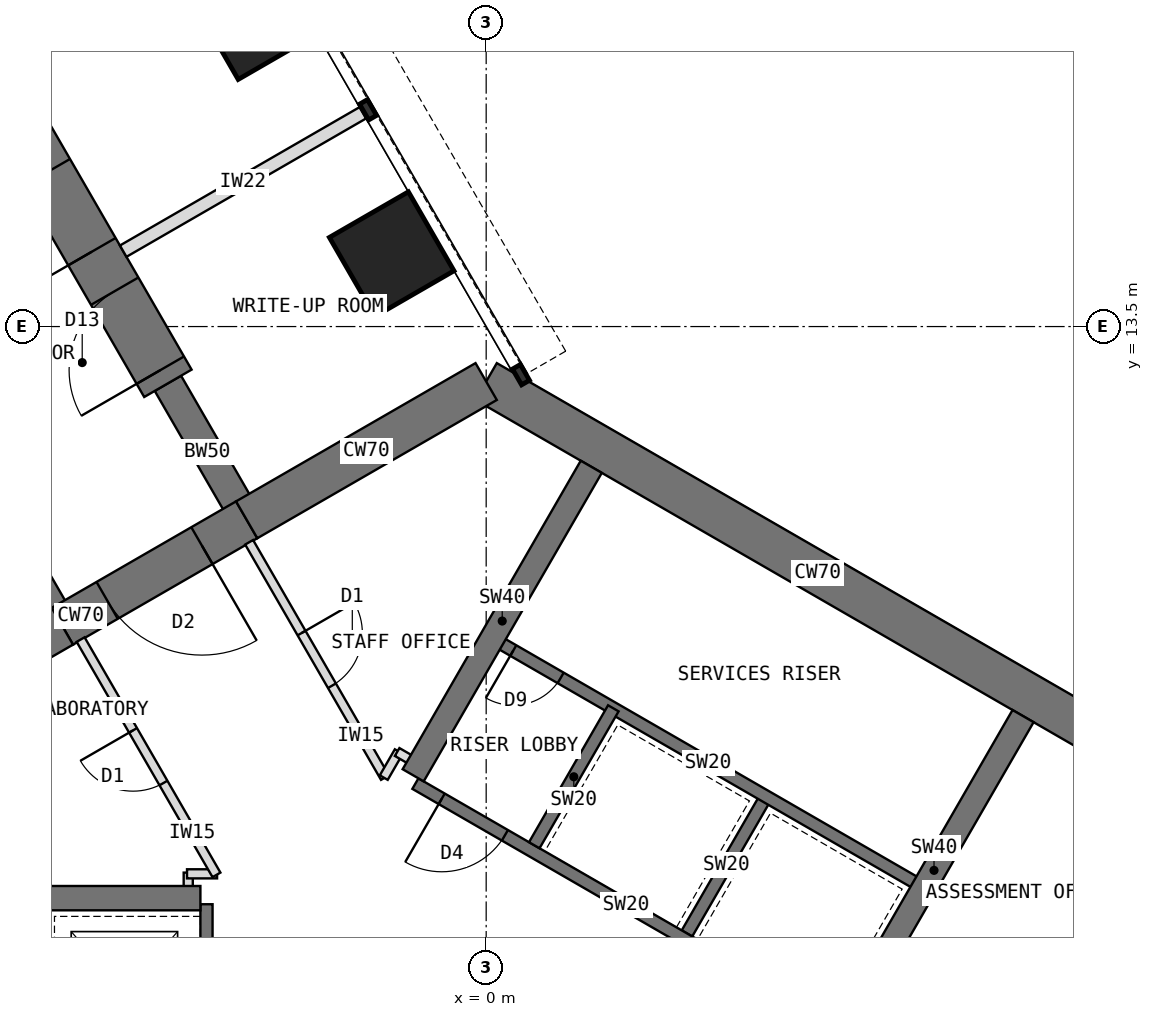
"""IFC4 building model, lengths in metres.
Left out: names, types, materials, properties, quantities, classifications, styles, units other than length and angle.
Written with IfcOpenShell. Run it as: python <this file> out.ifc"""

import sys

from ifc_helpers import new_model, si_unit, direction, frame, frame_2d, origin, origin_2d, place, context, subcontext, project, spatial, rectangle, extrude, element, fill, save


model = new_model("IFC4")
c1 = context("Model", 3, precision=1e-05, world=origin(), true_north=direction((0.0, 1.0)))
c2 = subcontext(c1, "Body", "Model", "MODEL_VIEW")
j1 = project(units=[si_unit("LENGTHUNIT", "METRE"), si_unit("PLANEANGLEUNIT", "RADIAN")], contexts=[c1])
p1 = place(None, origin())
s1 = spatial("IfcSite", under=j1, at=p1, CompositionType="ELEMENT")
p2 = place(p1, origin())
s2 = spatial("IfcBuilding", under=s1, at=p2, CompositionType="ELEMENT")
p3 = place(p2, frame((0.0, 0.0, 28.5)))
s3 = spatial("IfcBuildingStorey", under=s2, at=p3, CompositionType="ELEMENT", Elevation=28.5)
p4 = place(p3, frame((10.908, 6.298, 0.0), z_axis=(0.0, 0.0, 1.0), x_axis=(-0.866021940709, 0.500005998175, 0.0)))
e1 = element("IfcWall", 1, at=p4, inside=s3, PredefinedType="SHEAR", context=c2, shape_type="SweptSolid", body=[
    extrude(rectangle(XDim=12.596, YDim=0.7, at=frame_2d((6.298, 0.0))), origin(), (0.0, 0.0, 1.0), 4.0),
])
p5 = place(p3, frame((0.0, 12.596, 0.0), z_axis=(0.0, 0.0, 1.0), x_axis=(-0.866011268655, -0.500024481964, 0.0)))
e2 = element("IfcWall", 2, at=p5, inside=s3, PredefinedType="SHEAR", context=c2, shape_type="SweptSolid", body=[
    extrude(rectangle(XDim=4.548, YDim=0.7, at=frame_2d((2.274, 0.0))), origin(), (0.0, 0.0, 1.0), 4.0),
])
p6 = place(p3, frame((-3.939, 10.322, 0.0), z_axis=(0.0, 0.0, 1.0), x_axis=(-0.866019471182, -0.500010275428, 0.0)))
e3 = element("IfcWall", 3, at=p6, inside=s3, PredefinedType="SHEAR", context=c2, shape_type="SweptSolid", body=[
    extrude(rectangle(XDim=3.5, YDim=0.7, at=frame_2d((1.75, 0.0))), origin(), (0.0, 0.0, 1.0), 4.0),
])
p7 = place(p6, frame((0.85, 0.0, 0.0)))
e4 = element("IfcOpeningElement", 4, at=p7, cuts=e3, PredefinedType="OPENING", context=c2, shape_type="SweptSolid", body=[
    extrude(rectangle(XDim=1.8, YDim=2.1, at=frame_2d((0.9, 1.05))), frame((0.0, 0.36, 0.0), z_axis=(0.0, -1.0, 0.0), x_axis=(1.0, 0.0, 0.0)), (0.0, 0.0, 1.0), 0.72),
])
p8 = place(p3, frame((-6.97, 8.572, 0.0), z_axis=(0.0, 0.0, 1.0), x_axis=(-0.866034513004, -0.499984222037, 0.0)))
e5 = element("IfcWall", 5, at=p8, inside=s3, PredefinedType="SHEAR", context=c2, shape_type="SweptSolid", body=[
    extrude(rectangle(XDim=4.548, YDim=0.7, at=frame_2d((2.274, 0.0))), origin(), (0.0, 0.0, 1.0), 4.0),
])
for number, where, z_axis, x_axis in (
    (6, (-6.97, 8.572, 0.0), (0.0, 0.0, 1.0), (-0.5, 0.866, 0.0)),
    (7, (-3.939, 10.322, 0.0), (0.0, 0.0, 1.0), (-0.5, 0.866, 0.0)),
):
    element("IfcWall", number, at=place(p3, frame(where, z_axis=z_axis, x_axis=x_axis)), inside=s3, PredefinedType="SHEAR", context=c2, shape_type="SweptSolid", body=[
        extrude(rectangle(XDim=2.592, YDim=0.5, at=frame_2d((1.296, 0.0))), origin(), (0.0, 0.0, 1.0), 4.0),
    ])
p9 = place(p3, frame((-5.234, 12.566, 0.0), z_axis=(0.0, 0.0, 1.0), x_axis=(-0.500010103361, 0.866019570528, 0.0)))
e8 = element("IfcWall", 8, at=p9, inside=s3, PredefinedType="SHEAR", context=c2, shape_type="SweptSolid", body=[
    extrude(rectangle(XDim=13.2, YDim=0.9, at=frame_2d((6.6, 0.0))), origin(), (0.0, 0.0, 1.0), 4.0),
])
p10 = place(p9, frame((0.25, 0.0, 0.0)))
e9 = element("IfcOpeningElement", 9, at=p10, cuts=e8, PredefinedType="OPENING", context=c2, shape_type="SweptSolid", body=[
    extrude(rectangle(XDim=1.5, YDim=2.1, at=frame_2d((0.75, 1.05))), frame((0.0, 0.46, 0.0), z_axis=(0.0, -1.0, 0.0), x_axis=(1.0, 0.0, 0.0)), (0.0, 0.0, 1.0), 0.92),
])
p11 = place(p9, frame((2.5, 0.0, 0.0)))
e10 = element("IfcOpeningElement", 10, at=p11, cuts=e8, PredefinedType="OPENING", context=c2, shape_type="SweptSolid", body=[
    extrude(rectangle(XDim=1.5, YDim=2.1, at=frame_2d((0.75, 1.05))), frame((0.0, 0.46, 0.0), z_axis=(0.0, -1.0, 0.0), x_axis=(1.0, 0.0, 0.0)), (0.0, 0.0, 1.0), 0.92),
])
for number, where, z_axis, x_axis in (
    (11, (-1.554, 14.691, 0.0), (0.0, 0.0, 1.0), (0.866, 0.5, 0.0)),
    (12, (-3.804, 18.588, 0.0), (0.0, 0.0, 1.0), (0.866, 0.5, 0.0)),
):
    element("IfcColumn", number, at=place(p3, frame(where, z_axis=z_axis, x_axis=x_axis)), inside=s3, PredefinedType="COLUMN", context=c2, shape_type="SweptSolid", body=[
        extrude(rectangle(XDim=1.5, YDim=1.5, at=origin_2d()), origin(), (0.0, 0.0, 1.0), 4.0),
    ])
p12 = place(p3, frame((5.764, 1.984, 0.0), z_axis=(0.0, 0.0, 1.0), x_axis=(-0.866026010844, 0.49999894854, 0.0)))
e13 = element("IfcWall", 13, at=p12, inside=s3, PredefinedType="SHEAR", context=c2, shape_type="SweptSolid", body=[
    extrude(rectangle(XDim=8.0, YDim=0.2, at=frame_2d((4.0, 0.0))), origin(), (0.0, 0.0, 1.0), 4.0),
])
p13 = place(p12, frame((6.3, 0.0, 0.0)))
e14 = element("IfcOpeningElement", 14, at=p13, cuts=e13, PredefinedType="OPENING", context=c2, shape_type="SweptSolid", body=[
    extrude(rectangle(XDim=1.2, YDim=2.1, at=frame_2d((0.6, 1.05))), frame((0.0, 0.11, 0.0), z_axis=(0.0, -1.0, 0.0), x_axis=(1.0, 0.0, 0.0)), (0.0, 0.0, 1.0), 0.22),
])
for number, where, z_axis, x_axis in (
    (15, (3.303, 3.52, 0.0), (0.0, 0.0, 1.0), (0.5, 0.866, 0.0)),
    (16, (0.791, 4.97, 0.0), (0.0, 0.0, 1.0), (0.5, 0.866, 0.0)),
):
    element("IfcWall", number, at=place(p3, frame(where, z_axis=z_axis, x_axis=x_axis)), inside=s3, PredefinedType="SHEAR", context=c2, shape_type="SweptSolid", body=[
        extrude(rectangle(XDim=2.6, YDim=0.2, at=frame_2d((1.3, 0.0))), origin(), (0.0, 0.0, 1.0), 4.0),
    ])
p14 = place(p3, frame((7.114, 4.322, 0.0), z_axis=(0.0, 0.0, 1.0), x_axis=(-0.866026010844, 0.49999894854, 0.0)))
e17 = element("IfcWall", 17, at=p14, inside=s3, PredefinedType="SHEAR", context=c2, shape_type="SweptSolid", body=[
    extrude(rectangle(XDim=8.0, YDim=0.2, at=frame_2d((4.0, 0.0))), origin(), (0.0, 0.0, 1.0), 4.0),
])
p15 = place(p14, frame((6.8, 0.0, 0.0)))
e18 = element("IfcOpeningElement", 18, at=p15, cuts=e17, PredefinedType="OPENING", context=c2, shape_type="SweptSolid", body=[
    extrude(rectangle(XDim=0.9, YDim=2.1, at=frame_2d((0.45, 1.05))), frame((0.0, 0.11, 0.0), z_axis=(0.0, -1.0, 0.0), x_axis=(1.0, 0.0, 0.0)), (0.0, 0.0, 1.0), 0.22),
])
for number, where, z_axis, x_axis in (
    (19, (-1.201, 6.12, 0.0), (0.0, 0.0, 1.0), (0.5, 0.866, 0.0)),
    (20, (5.901, 2.02, 0.0), (0.0, 0.0, 1.0), (0.5, 0.866, 0.0)),
):
    element("IfcWall", number, at=place(p3, frame(where, z_axis=z_axis, x_axis=x_axis)), inside=s3, PredefinedType="SHEAR", context=c2, shape_type="SweptSolid", body=[
        extrude(rectangle(XDim=5.858, YDim=0.4, at=frame_2d((2.929, 0.0))), origin(), (0.0, 0.0, 1.0), 4.0),
    ])
p16 = place(p3, frame((-4.6, 4.0, 0.0), z_axis=(0.0, 0.0, 1.0), x_axis=(0.0, -1.0, 0.0)))
e21 = element("IfcWall", 21, at=p16, inside=s3, PredefinedType="SHEAR", context=c2, shape_type="SweptSolid", body=[
    extrude(rectangle(XDim=8.0, YDim=0.2, at=frame_2d((4.0, 0.0))), origin(), (0.0, 0.0, 1.0), 4.0),
])
p17 = place(p16, frame((6.3, 0.0, 0.0)))
e22 = element("IfcOpeningElement", 22, at=p17, cuts=e21, PredefinedType="OPENING", context=c2, shape_type="SweptSolid", body=[
    extrude(rectangle(XDim=1.2, YDim=2.1, at=frame_2d((0.6, 1.05))), frame((0.0, 0.11, 0.0), z_axis=(0.0, -1.0, 0.0), x_axis=(1.0, 0.0, 0.0)), (0.0, 0.0, 1.0), 0.22),
])
p18 = place(p16, frame((0.9, 0.0, 0.0)))
e23 = element("IfcOpeningElement", 23, at=p18, cuts=e21, PredefinedType="OPENING", context=c2, shape_type="SweptSolid", body=[
    extrude(rectangle(XDim=1.1, YDim=2.2, at=frame_2d((0.55, 1.1))), frame((0.0, 0.11, 0.0), z_axis=(0.0, -1.0, 0.0), x_axis=(1.0, 0.0, 0.0)), (0.0, 0.0, 1.0), 0.22),
])
p19 = place(p3, frame((-4.7, 4.1, 0.0), z_axis=(0.0, 0.0, 1.0), x_axis=(-1.0, 0.0, 0.0)))
e24 = element("IfcWall", 24, at=p19, inside=s3, PredefinedType="SHEAR", context=c2, shape_type="SweptSolid", body=[
    extrude(rectangle(XDim=5.858, YDim=0.4, at=frame_2d((2.929, 0.0))), origin(), (0.0, 0.0, 1.0), 4.0),
])
p20 = place(p3, frame((-5.97, 14.74, 0.0), z_axis=(0.0, 0.0, 1.0), x_axis=(0.866035472144, 0.499982560684, 0.0)))
e25 = element("IfcWall", 25, at=p20, inside=s3, PredefinedType="PARTITIONING", context=c2, shape_type="SweptSolid", body=[
    extrude(rectangle(XDim=4.55, YDim=0.215, at=frame_2d((2.275, 0.0))), origin(), (0.0, 0.0, 1.0), 3.8),
])
p21 = place(p3, frame((-4.9, 4.09, 0.0), z_axis=(0.0, 0.0, 1.0), x_axis=(0.0, 1.0, 0.0)))
e26 = element("IfcWall", 26, at=p21, inside=s3, PredefinedType="PARTITIONING", context=c2, shape_type="SweptSolid", body=[
    extrude(rectangle(XDim=0.43, YDim=0.15, at=frame_2d((0.215, 0.0))), origin(), (0.0, 0.0, 1.0), 3.8),
])
p22 = place(p3, frame((-4.92, 4.5, 0.0), z_axis=(0.0, 0.0, 1.0), x_axis=(1.0, 0.0, 0.0)))
e27 = element("IfcWall", 27, at=p22, inside=s3, PredefinedType="PARTITIONING", context=c2, shape_type="SweptSolid", body=[
    extrude(rectangle(XDim=0.494, YDim=0.15, at=frame_2d((0.247, 0.0))), origin(), (0.0, 0.0, 1.0), 3.8),
])
p23 = place(p3, frame((-4.436, 4.483, 0.0), z_axis=(0.0, 0.0, 1.0), x_axis=(-0.500017246033, 0.866015446554, 0.0)))
e28 = element("IfcWall", 28, at=p23, inside=s3, PredefinedType="PARTITIONING", context=c2, shape_type="SweptSolid", body=[
    extrude(rectangle(XDim=4.469, YDim=0.15, at=frame_2d((2.234, 0.0))), origin(), (0.0, 0.0, 1.0), 3.8),
])
p24 = place(p23, frame((1.744, 0.0, 0.0)))
e29 = element("IfcOpeningElement", 29, at=p24, cuts=e28, PredefinedType="OPENING", context=c2, shape_type="SweptSolid", body=[
    extrude(rectangle(XDim=1.0, YDim=2.1, at=frame_2d((0.5, 1.05))), frame((0.0, 0.085, 0.0), z_axis=(0.0, -1.0, 0.0), x_axis=(1.0, 0.0, 0.0)), (0.0, 0.0, 1.0), 0.17),
])
p25 = place(p3, frame((-3.898, 9.952, 0.0), z_axis=(0.0, 0.0, 1.0), x_axis=(0.499999927604, -0.866025445582, 0.0)))
e30 = element("IfcWall", 30, at=p25, inside=s3, PredefinedType="PARTITIONING", context=c2, shape_type="SweptSolid", body=[
    extrude(rectangle(XDim=4.468, YDim=0.15, at=frame_2d((2.234, 0.0))), origin(), (0.0, 0.0, 1.0), 3.8),
])
p26 = place(p25, frame((1.724, 0.0, 0.0)))
e31 = element("IfcOpeningElement", 31, at=p26, cuts=e30, PredefinedType="OPENING", context=c2, shape_type="SweptSolid", body=[
    extrude(rectangle(XDim=1.0, YDim=2.1, at=frame_2d((0.5, 1.05))), frame((0.0, 0.085, 0.0), z_axis=(0.0, -1.0, 0.0), x_axis=(1.0, 0.0, 0.0)), (0.0, 0.0, 1.0), 0.17),
])
p27 = place(p3, frame((-1.684, 6.083, 0.0), z_axis=(0.0, 0.0, 1.0), x_axis=(0.50033519877, 0.865831790172, 0.0)))
e32 = element("IfcWall", 32, at=p27, inside=s3, PredefinedType="PARTITIONING", context=c2, shape_type="SweptSolid", body=[
    extrude(rectangle(XDim=0.494, YDim=0.15, at=frame_2d((0.247, 0.0))), origin(), (0.0, 0.0, 1.0), 3.8),
])
p28 = place(p3, frame((-1.464, 6.503, 0.0), z_axis=(0.0, 0.0, 1.0), x_axis=(0.866138304741, -0.499804398801, 0.0)))
e33 = element("IfcWall", 33, at=p28, inside=s3, PredefinedType="PARTITIONING", context=c2, shape_type="SweptSolid", body=[
    extrude(rectangle(XDim=0.43, YDim=0.15, at=frame_2d((0.215, 0.0))), origin(), (0.0, 0.0, 1.0), 3.8),
])
p29 = place(p13, origin())
e34 = element("IfcDoor", 34, at=p29, inside=s3, OperationType="SINGLE_SWING_RIGHT", PredefinedType="DOOR", context=c2, shape_type="SweptSolid", body=[
    extrude(rectangle(XDim=1.2, YDim=2.1, at=frame_2d((0.6, 1.05))), frame((0.0, 0.025, 0.0), z_axis=(0.0, -1.0, 0.0), x_axis=(1.0, 0.0, 0.0)), (0.0, 0.0, 1.0), 0.05),
])
fill(e14, e34)
p30 = place(p15, origin())
e35 = element("IfcDoor", 35, at=p30, inside=s3, OperationType="SINGLE_SWING_RIGHT", PredefinedType="DOOR", context=c2, shape_type="SweptSolid", body=[
    extrude(rectangle(XDim=0.9, YDim=2.1, at=frame_2d((0.45, 1.05))), frame((0.0, 0.025, 0.0), z_axis=(0.0, -1.0, 0.0), x_axis=(1.0, 0.0, 0.0)), (0.0, 0.0, 1.0), 0.05),
])
fill(e18, e35)
p31 = place(p7, origin())
e36 = element("IfcDoor", 36, at=p31, inside=s3, OperationType="DOUBLE_DOOR_DOUBLE_SWING", PredefinedType="DOOR", context=c2, shape_type="SweptSolid", body=[
    extrude(rectangle(XDim=1.72, YDim=2.06, at=frame_2d((0.9, 1.03))), frame((0.0, 0.025, 0.0), z_axis=(0.0, -1.0, 0.0), x_axis=(1.0, 0.0, 0.0)), (0.0, 0.0, 1.0), 0.05),
    extrude(rectangle(XDim=0.04, YDim=2.1, at=frame_2d((0.02, 1.05))), frame((0.0, 0.35, 0.0), z_axis=(0.0, -1.0, 0.0), x_axis=(1.0, 0.0, 0.0)), (0.0, 0.0, 1.0), 0.699),
    extrude(rectangle(XDim=0.04, YDim=2.1, at=frame_2d((1.78, 1.05))), frame((0.0, 0.35, 0.0), z_axis=(0.0, -1.0, 0.0), x_axis=(1.0, 0.0, 0.0)), (0.0, 0.0, 1.0), 0.699),
    extrude(rectangle(XDim=1.72, YDim=0.04, at=frame_2d((0.9, 2.08))), frame((0.0, 0.35, 0.0), z_axis=(0.0, -1.0, 0.0), x_axis=(1.0, 0.0, 0.0)), (0.0, 0.0, 1.0), 0.699),
])
fill(e4, e36)
p32 = place(p26, origin())
e37 = element("IfcDoor", 37, at=p32, inside=s3, OperationType="SINGLE_SWING_LEFT", PredefinedType="DOOR", context=c2, shape_type="SweptSolid", body=[
    extrude(rectangle(XDim=1.0, YDim=2.1, at=frame_2d((0.5, 1.05))), frame((0.0, 0.025, 0.0), z_axis=(0.0, -1.0, 0.0), x_axis=(1.0, 0.0, 0.0)), (0.0, 0.0, 1.0), 0.05),
])
fill(e31, e37)
p33 = place(p24, origin())
e38 = element("IfcDoor", 38, at=p33, inside=s3, OperationType="SINGLE_SWING_RIGHT", PredefinedType="DOOR", context=c2, shape_type="SweptSolid", body=[
    extrude(rectangle(XDim=1.0, YDim=2.1, at=frame_2d((0.5, 1.05))), frame((0.0, 0.025, 0.0), z_axis=(0.0, -1.0, 0.0), x_axis=(1.0, 0.0, 0.0)), (0.0, 0.0, 1.0), 0.05),
])
fill(e29, e38)
p34 = place(p10, origin())
e39 = element("IfcDoor", 39, at=p34, inside=s3, OperationType="DOUBLE_DOOR_SINGLE_SWING", PredefinedType="DOOR", context=c2, shape_type="SweptSolid", body=[
    extrude(rectangle(XDim=1.42, YDim=2.06, at=frame_2d((0.75, 1.03))), frame((0.0, 0.025, 0.0), z_axis=(0.0, -1.0, 0.0), x_axis=(1.0, 0.0, 0.0)), (0.0, 0.0, 1.0), 0.05),
    extrude(rectangle(XDim=0.04, YDim=2.1, at=frame_2d((0.02, 1.05))), frame((0.0, 0.45, 0.0), z_axis=(0.0, -1.0, 0.0), x_axis=(1.0, 0.0, 0.0)), (0.0, 0.0, 1.0), 0.899),
    extrude(rectangle(XDim=0.04, YDim=2.1, at=frame_2d((1.48, 1.05))), frame((0.0, 0.45, 0.0), z_axis=(0.0, -1.0, 0.0), x_axis=(1.0, 0.0, 0.0)), (0.0, 0.0, 1.0), 0.899),
    extrude(rectangle(XDim=1.42, YDim=0.04, at=frame_2d((0.75, 2.08))), frame((0.0, 0.45, 0.0), z_axis=(0.0, -1.0, 0.0), x_axis=(1.0, 0.0, 0.0)), (0.0, 0.0, 1.0), 0.899),
])
fill(e9, e39)
p35 = place(p11, origin())
e40 = element("IfcDoor", 40, at=p35, inside=s3, OperationType="DOUBLE_DOOR_SINGLE_SWING", PredefinedType="DOOR", context=c2, shape_type="SweptSolid", body=[
    extrude(rectangle(XDim=1.42, YDim=2.06, at=frame_2d((0.75, 1.03))), frame((0.0, 0.025, 0.0), z_axis=(0.0, -1.0, 0.0), x_axis=(1.0, 0.0, 0.0)), (0.0, 0.0, 1.0), 0.05),
    extrude(rectangle(XDim=0.04, YDim=2.1, at=frame_2d((0.02, 1.05))), frame((0.0, 0.45, 0.0), z_axis=(0.0, -1.0, 0.0), x_axis=(1.0, 0.0, 0.0)), (0.0, 0.0, 1.0), 0.899),
    extrude(rectangle(XDim=0.04, YDim=2.1, at=frame_2d((1.48, 1.05))), frame((0.0, 0.45, 0.0), z_axis=(0.0, -1.0, 0.0), x_axis=(1.0, 0.0, 0.0)), (0.0, 0.0, 1.0), 0.899),
    extrude(rectangle(XDim=1.42, YDim=0.04, at=frame_2d((0.75, 2.08))), frame((0.0, 0.45, 0.0), z_axis=(0.0, -1.0, 0.0), x_axis=(1.0, 0.0, 0.0)), (0.0, 0.0, 1.0), 0.899),
])
fill(e10, e40)
save(model, sys.argv[1])
